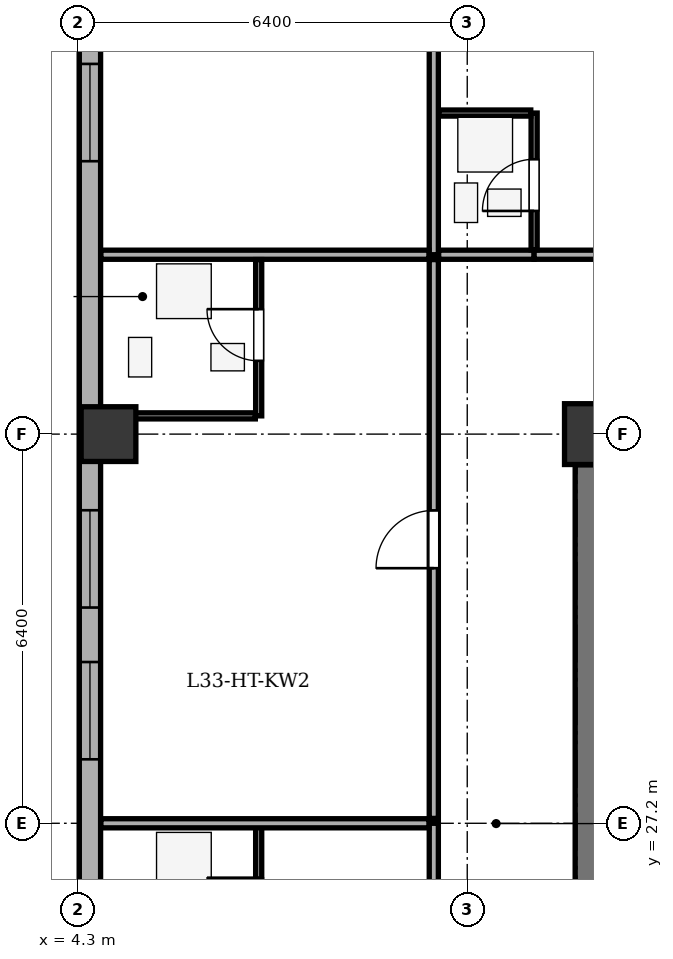
"""IFC4 building model, lengths in metres.
Left out: names, types, materials, properties, quantities, classifications, styles, units other than length and angle.
Written with IfcOpenShell. Run it as: python <this file> out.ifc"""

import sys

from ifc_helpers import new_model, si_unit, direction, frame, frame_2d, origin, origin_2d, place, context, subcontext, project, spatial, rectangle, extrude, element, fill, save


model = new_model("IFC4")
c1 = context("Model", 3, precision=1e-05, world=origin(), true_north=direction((0.0, 1.0)))
c2 = subcontext(c1, "Body", "Model", "MODEL_VIEW")
j1 = project(units=[si_unit("LENGTHUNIT", "METRE"), si_unit("PLANEANGLEUNIT", "RADIAN")], contexts=[c1])
p1 = place(None, origin())
s1 = spatial("IfcSite", under=j1, at=p1, CompositionType="ELEMENT")
p2 = place(p1, origin())
s2 = spatial("IfcBuilding", under=s1, at=p2, CompositionType="ELEMENT")
p3 = place(p2, frame((0.0, 0.0, 134.3)))
s3 = spatial("IfcBuildingStorey", under=s2, at=p3, CompositionType="ELEMENT", Elevation=134.3)
p4 = place(p3, frame((12.8, 33.6, 0.0), z_axis=(0.0, 0.0, 1.0), x_axis=(1.0, 0.0, 0.0)))
e1 = element("IfcColumn", 1, at=p4, inside=s3, PredefinedType="COLUMN", context=c2, shape_type="SweptSolid", body=[
    extrude(rectangle(XDim=1.0, YDim=1.0, at=origin_2d()), origin(), (0.0, 0.0, 1.0), 3.5),
])
p5 = place(p3, frame((4.8, 33.6, 0.0), z_axis=(0.0, 0.0, 1.0), x_axis=(1.0, 0.0, 0.0)))
e2 = element("IfcColumn", 2, at=p5, inside=s3, PredefinedType="COLUMN", context=c2, shape_type="SweptSolid", body=[
    extrude(rectangle(XDim=0.9, YDim=0.9, at=origin_2d()), origin(), (0.0, 0.0, 1.0), 3.5),
])
p6 = place(p3, frame((4.495, 6.5, 0.0), z_axis=(0.0, 0.0, 1.0), x_axis=(0.0, 1.0, 0.0)))
e3 = element("IfcWall", 3, at=p6, inside=s3, PredefinedType="STANDARD", context=c2, shape_type="SweptSolid", body=[
    extrude(rectangle(XDim=35.0, YDim=0.35, at=frame_2d((17.5, 0.0))), origin(), (0.0, 0.0, 1.0), 2.785),
])
p7 = place(p6, frame((2.595, 0.0, 0.75)))
e4 = element("IfcOpeningElement", 4, at=p7, cuts=e3, PredefinedType="OPENING", context=c2, shape_type="SweptSolid", body=[
    extrude(rectangle(XDim=1.6, YDim=1.75, at=frame_2d((0.8, 0.875))), frame((0.0, 0.185, 0.0), z_axis=(0.0, -1.0, 0.0), x_axis=(1.0, 0.0, 0.0)), (0.0, 0.0, 1.0), 0.37),
])
p8 = place(p6, frame((7.181, 0.0, 0.75)))
e5 = element("IfcOpeningElement", 5, at=p8, cuts=e3, PredefinedType="OPENING", context=c2, shape_type="SweptSolid", body=[
    extrude(rectangle(XDim=2.1, YDim=1.75, at=frame_2d((1.05, 0.875))), frame((0.0, 0.185, 0.0), z_axis=(0.0, -1.0, 0.0), x_axis=(1.0, 0.0, 0.0)), (0.0, 0.0, 1.0), 0.37),
])
p9 = place(p6, frame((15.6, 0.0, 0.75)))
e6 = element("IfcOpeningElement", 6, at=p9, cuts=e3, PredefinedType="OPENING", context=c2, shape_type="SweptSolid", body=[
    extrude(rectangle(XDim=1.35, YDim=1.75, at=frame_2d((0.675, 0.875))), frame((0.0, 0.185, 0.0), z_axis=(0.0, -1.0, 0.0), x_axis=(1.0, 0.0, 0.0)), (0.0, 0.0, 1.0), 0.37),
])
p10 = place(p6, frame((21.752, 0.0, 0.75)))
e7 = element("IfcOpeningElement", 7, at=p10, cuts=e3, PredefinedType="OPENING", context=c2, shape_type="SweptSolid", body=[
    extrude(rectangle(XDim=1.6, YDim=1.75, at=frame_2d((0.8, 0.875))), frame((0.0, 0.185, 0.0), z_axis=(0.0, -1.0, 0.0), x_axis=(1.0, 0.0, 0.0)), (0.0, 0.0, 1.0), 0.37),
])
p11 = place(p6, frame((24.248, 0.0, 0.75)))
e8 = element("IfcOpeningElement", 8, at=p11, cuts=e3, PredefinedType="OPENING", context=c2, shape_type="SweptSolid", body=[
    extrude(rectangle(XDim=1.6, YDim=1.75, at=frame_2d((0.8, 0.875))), frame((0.0, 0.185, 0.0), z_axis=(0.0, -1.0, 0.0), x_axis=(1.0, 0.0, 0.0)), (0.0, 0.0, 1.0), 0.37),
])
p12 = place(p6, frame((31.588, 0.0, 0.75)))
e9 = element("IfcOpeningElement", 9, at=p12, cuts=e3, PredefinedType="OPENING", context=c2, shape_type="SweptSolid", body=[
    extrude(rectangle(XDim=1.6, YDim=1.75, at=frame_2d((0.8, 0.875))), frame((0.0, 0.185, 0.0), z_axis=(0.0, -1.0, 0.0), x_axis=(1.0, 0.0, 0.0)), (0.0, 0.0, 1.0), 0.37),
])
p13 = place(p3, frame((12.8, 21.305, 0.0), z_axis=(0.0, 0.0, 1.0), x_axis=(0.0, 1.0, 0.0)))
e10 = element("IfcWall", 10, at=p13, inside=s3, PredefinedType="SHEAR", context=c2, shape_type="SweptSolid", body=[
    extrude(rectangle(XDim=11.79, YDim=0.65, at=frame_2d((5.895, 0.0))), origin(), (0.0, 0.0, 1.0), 3.2),
])
p14 = place(p3, frame((10.15, 36.55, 0.0), z_axis=(0.0, 0.0, 1.0), x_axis=(0.0, 1.0, 0.0)))
e11 = element("IfcWall", 11, at=p14, inside=s3, PredefinedType="PARTITIONING", context=c2, shape_type="SweptSolid", body=[
    extrude(rectangle(XDim=9.575, YDim=0.15, at=frame_2d((4.788, 0.0))), origin(), (0.0, 0.0, 1.0), 3.2),
])
p15 = place(p3, frame((10.23, 36.55, 0.0), z_axis=(0.0, 0.0, 1.0), x_axis=(1.0, 0.0, 0.0)))
e12 = element("IfcWall", 12, at=p15, inside=s3, PredefinedType="PARTITIONING", context=c2, shape_type="SweptSolid", body=[
    extrude(rectangle(XDim=1.57, YDim=0.15, at=frame_2d((0.785, 0.0))), origin(), (0.0, 0.0, 1.0), 3.2),
])
p16 = place(p3, frame((11.8, 36.55, 0.0), z_axis=(0.0, 0.0, 1.0), x_axis=(1.0, 0.0, 0.0)))
e13 = element("IfcWall", 13, at=p16, inside=s3, PredefinedType="PARTITIONING", context=c2, shape_type="SweptSolid", body=[
    extrude(rectangle(XDim=4.156, YDim=0.15, at=frame_2d((2.078, 0.0))), origin(), (0.0, 0.0, 1.0), 3.2),
])
p17 = place(p16, frame((1.598, 0.0, 0.0)))
e14 = element("IfcOpeningElement", 14, at=p17, cuts=e13, PredefinedType="OPENING", context=c2, shape_type="SweptSolid", body=[
    extrude(rectangle(XDim=0.95, YDim=2.1, at=frame_2d((0.475, 1.05))), frame((0.0, 0.085, 0.0), z_axis=(0.0, -1.0, 0.0), x_axis=(1.0, 0.0, 0.0)), (0.0, 0.0, 1.0), 0.17),
])
p18 = place(p3, frame((11.8, 36.63, 0.0), z_axis=(0.0, 0.0, 1.0), x_axis=(0.0, 1.0, 0.0)))
e15 = element("IfcWall", 15, at=p18, inside=s3, PredefinedType="PARTITIONING", context=c2, shape_type="SweptSolid", body=[
    extrude(rectangle(XDim=2.25, YDim=0.1, at=frame_2d((1.125, 0.0))), origin(), (0.0, 0.0, 1.0), 3.2),
])
p19 = place(p18, frame((0.64, 0.0, 0.0)))
e16 = element("IfcOpeningElement", 16, at=p19, cuts=e15, PredefinedType="OPENING", context=c2, shape_type="SweptSolid", body=[
    extrude(rectangle(XDim=0.85, YDim=2.05, at=frame_2d((0.425, 1.025))), frame((0.0, 0.06, 0.0), z_axis=(0.0, -1.0, 0.0), x_axis=(1.0, 0.0, 0.0)), (0.0, 0.0, 1.0), 0.12),
])
p20 = place(p3, frame((10.23, 38.88, 0.0), z_axis=(0.0, 0.0, 1.0), x_axis=(1.0, 0.0, 0.0)))
e17 = element("IfcWall", 17, at=p20, inside=s3, PredefinedType="PARTITIONING", context=c2, shape_type="SweptSolid", body=[
    extrude(rectangle(XDim=1.515, YDim=0.1, at=frame_2d((0.758, 0.0))), origin(), (0.0, 0.0, 1.0), 3.2),
])
p21 = place(p3, frame((4.675, 36.55, 0.0), z_axis=(0.0, 0.0, 1.0), x_axis=(1.0, 0.0, 0.0)))
e18 = element("IfcWall", 18, at=p21, inside=s3, PredefinedType="PARTITIONING", context=c2, shape_type="SweptSolid", body=[
    extrude(rectangle(XDim=5.395, YDim=0.15, at=frame_2d((2.698, 0.0))), origin(), (0.0, 0.0, 1.0), 3.2),
])
p22 = place(p3, frame((10.15, 17.93, 0.0), z_axis=(0.0, 0.0, 1.0), x_axis=(0.0, 1.0, 0.0)))
e19 = element("IfcWall", 19, at=p22, inside=s3, PredefinedType="PARTITIONING", context=c2, shape_type="SweptSolid", body=[
    extrude(rectangle(XDim=9.27, YDim=0.15, at=frame_2d((4.635, 0.0))), origin(), (0.0, 0.0, 1.0), 3.2),
])
p23 = place(p22, frame((4.115, 0.0, 0.0)))
e20 = element("IfcOpeningElement", 20, at=p23, cuts=e19, PredefinedType="OPENING", context=c2, shape_type="SweptSolid", body=[
    extrude(rectangle(XDim=0.95, YDim=2.1, at=frame_2d((0.475, 1.05))), frame((0.0, 0.085, 0.0), z_axis=(0.0, -1.0, 0.0), x_axis=(1.0, 0.0, 0.0)), (0.0, 0.0, 1.0), 0.17),
])
p24 = place(p3, frame((7.27, 24.55, 0.0), z_axis=(0.0, 0.0, 1.0), x_axis=(0.0, 1.0, 0.0)))
e21 = element("IfcWall", 21, at=p24, inside=s3, PredefinedType="PARTITIONING", context=c2, shape_type="SweptSolid", body=[
    extrude(rectangle(XDim=2.65, YDim=0.1, at=frame_2d((1.325, 0.0))), origin(), (0.0, 0.0, 1.0), 3.2),
])
p25 = place(p24, frame((0.905, 0.0, 0.0)))
e22 = element("IfcOpeningElement", 22, at=p25, cuts=e21, PredefinedType="OPENING", context=c2, shape_type="SweptSolid", body=[
    extrude(rectangle(XDim=0.85, YDim=2.05, at=frame_2d((0.425, 1.025))), frame((0.0, 0.06, 0.0), z_axis=(0.0, -1.0, 0.0), x_axis=(1.0, 0.0, 0.0)), (0.0, 0.0, 1.0), 0.12),
])
p26 = place(p3, frame((4.675, 27.2, 0.0), z_axis=(0.0, 0.0, 1.0), x_axis=(1.0, 0.0, 0.0)))
e23 = element("IfcWall", 23, at=p26, inside=s3, PredefinedType="PARTITIONING", context=c2, shape_type="SweptSolid", body=[
    extrude(rectangle(XDim=5.395, YDim=0.15, at=frame_2d((2.698, 0.0))), origin(), (0.0, 0.0, 1.0), 3.2),
])
p27 = place(p3, frame((10.15, 27.28, 0.0), z_axis=(0.0, 0.0, 1.0), x_axis=(0.0, 1.0, 0.0)))
e24 = element("IfcWall", 24, at=p27, inside=s3, PredefinedType="PARTITIONING", context=c2, shape_type="SweptSolid", body=[
    extrude(rectangle(XDim=9.19, YDim=0.15, at=frame_2d((4.595, 0.0))), origin(), (0.0, 0.0, 1.0), 3.2),
])
p28 = place(p27, frame((4.115, 0.0, 0.0)))
e25 = element("IfcOpeningElement", 25, at=p28, cuts=e24, PredefinedType="OPENING", context=c2, shape_type="SweptSolid", body=[
    extrude(rectangle(XDim=0.95, YDim=2.1, at=frame_2d((0.475, 1.05))), frame((0.0, 0.085, 0.0), z_axis=(0.0, -1.0, 0.0), x_axis=(1.0, 0.0, 0.0)), (0.0, 0.0, 1.0), 0.17),
])
p29 = place(p3, frame((7.27, 33.9, 0.0), z_axis=(0.0, 0.0, 1.0), x_axis=(0.0, 1.0, 0.0)))
e26 = element("IfcWall", 26, at=p29, inside=s3, PredefinedType="PARTITIONING", context=c2, shape_type="SweptSolid", body=[
    extrude(rectangle(XDim=2.57, YDim=0.1, at=frame_2d((1.285, 0.0))), origin(), (0.0, 0.0, 1.0), 3.2),
])
p30 = place(p29, frame((0.905, 0.0, 0.0)))
e27 = element("IfcOpeningElement", 27, at=p30, cuts=e26, PredefinedType="OPENING", context=c2, shape_type="SweptSolid", body=[
    extrude(rectangle(XDim=0.85, YDim=2.05, at=frame_2d((0.425, 1.025))), frame((0.0, 0.06, 0.0), z_axis=(0.0, -1.0, 0.0), x_axis=(1.0, 0.0, 0.0)), (0.0, 0.0, 1.0), 0.12),
])
p31 = place(p3, frame((4.675, 33.9, 0.0), z_axis=(0.0, 0.0, 1.0), x_axis=(1.0, 0.0, 0.0)))
e28 = element("IfcWall", 28, at=p31, inside=s3, PredefinedType="PARTITIONING", context=c2, shape_type="SweptSolid", body=[
    extrude(rectangle(XDim=2.54, YDim=0.1, at=frame_2d((1.27, 0.0))), origin(), (0.0, 0.0, 1.0), 2.535),
])
p32 = place(p10, origin())
e29 = element("IfcWindow", 29, at=p32, inside=s3, PartitioningType="SINGLE_PANEL", PredefinedType="WINDOW", context=c2, shape_type="SweptSolid", body=[
    extrude(rectangle(XDim=1.6, YDim=1.75, at=frame_2d((0.8, 0.875))), frame((0.0, -0.01, 0.0), z_axis=(0.0, -1.0, 0.0), x_axis=(1.0, 0.0, 0.0)), (0.0, 0.0, 1.0), 0.06),
])
fill(e7, e29)
p33 = place(p11, origin())
e30 = element("IfcWindow", 30, at=p33, inside=s3, PartitioningType="SINGLE_PANEL", PredefinedType="WINDOW", context=c2, shape_type="SweptSolid", body=[
    extrude(rectangle(XDim=1.6, YDim=1.75, at=frame_2d((0.8, 0.875))), frame((0.0, -0.01, 0.0), z_axis=(0.0, -1.0, 0.0), x_axis=(1.0, 0.0, 0.0)), (0.0, 0.0, 1.0), 0.06),
])
fill(e8, e30)
p34 = place(p12, origin())
e31 = element("IfcWindow", 31, at=p34, inside=s3, PartitioningType="SINGLE_PANEL", PredefinedType="WINDOW", context=c2, shape_type="SweptSolid", body=[
    extrude(rectangle(XDim=1.6, YDim=1.75, at=frame_2d((0.8, 0.875))), frame((0.0, -0.01, 0.0), z_axis=(0.0, -1.0, 0.0), x_axis=(1.0, 0.0, 0.0)), (0.0, 0.0, 1.0), 0.06),
])
fill(e9, e31)
p35 = place(p19, origin())
e32 = element("IfcDoor", 32, at=p35, inside=s3, OperationType="SINGLE_SWING_LEFT", PredefinedType="DOOR", context=c2, shape_type="SweptSolid", body=[
    extrude(rectangle(XDim=0.85, YDim=2.05, at=frame_2d((0.425, 1.025))), frame((0.0, 0.025, 0.0), z_axis=(0.0, -1.0, 0.0), x_axis=(1.0, 0.0, 0.0)), (0.0, 0.0, 1.0), 0.05),
])
fill(e16, e32)
p36 = place(p25, origin())
e33 = element("IfcDoor", 33, at=p36, inside=s3, OperationType="SINGLE_SWING_RIGHT", PredefinedType="DOOR", context=c2, shape_type="SweptSolid", body=[
    extrude(rectangle(XDim=0.85, YDim=2.05, at=frame_2d((0.425, 1.025))), frame((0.0, 0.025, 0.0), z_axis=(0.0, -1.0, 0.0), x_axis=(1.0, 0.0, 0.0)), (0.0, 0.0, 1.0), 0.05),
])
fill(e22, e33)
p37 = place(p30, origin())
e34 = element("IfcDoor", 34, at=p37, inside=s3, OperationType="SINGLE_SWING_RIGHT", PredefinedType="DOOR", context=c2, shape_type="SweptSolid", body=[
    extrude(rectangle(XDim=0.85, YDim=2.05, at=frame_2d((0.425, 1.025))), frame((0.0, 0.025, 0.0), z_axis=(0.0, -1.0, 0.0), x_axis=(1.0, 0.0, 0.0)), (0.0, 0.0, 1.0), 0.05),
])
fill(e27, e34)
p38 = place(p28, origin())
e35 = element("IfcDoor", 35, at=p38, inside=s3, OperationType="SINGLE_SWING_LEFT", PredefinedType="DOOR", context=c2, shape_type="SweptSolid", body=[
    extrude(rectangle(XDim=0.95, YDim=2.1, at=frame_2d((0.475, 1.05))), frame((0.0, 0.025, 0.0), z_axis=(0.0, -1.0, 0.0), x_axis=(1.0, 0.0, 0.0)), (0.0, 0.0, 1.0), 0.05),
])
fill(e25, e35)
save(model, sys.argv[1])
